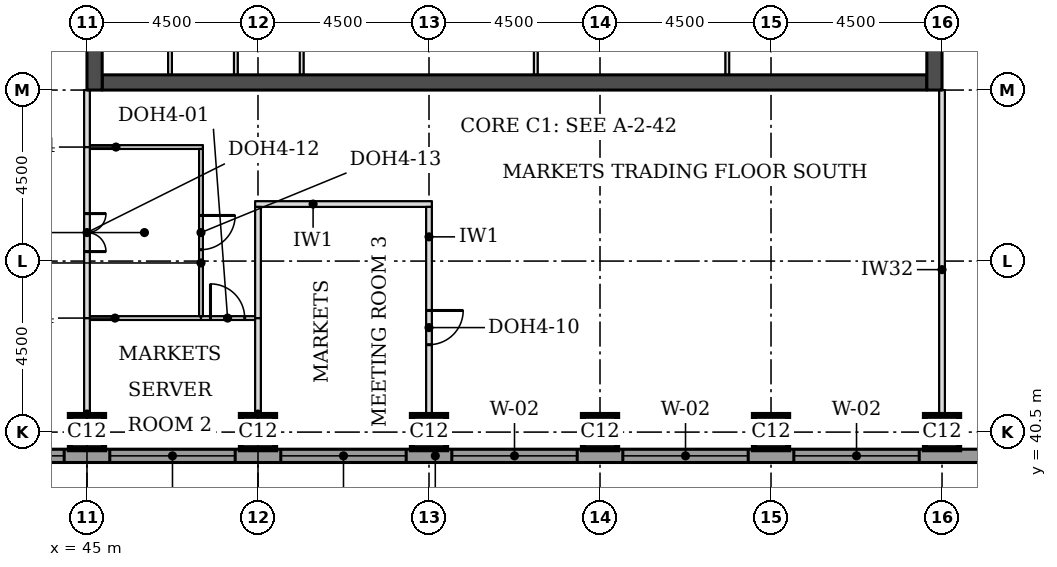
"""IFC4 building model, lengths in metres.
Left out: names, types, materials, properties, quantities, classifications, styles, units other than length and angle.
Written with IfcOpenShell. Run it as: python <this file> out.ifc"""

import sys

from ifc_helpers import new_model, si_unit, direction, frame, frame_2d, origin, origin_2d, place, context, subcontext, project, spatial, rectangle, extrude, element, fill, save


model = new_model("IFC4")
c1 = context("Model", 3, precision=1e-05, world=origin(), true_north=direction((0.0, 1.0)))
c2 = subcontext(c1, "Body", "Model", "MODEL_VIEW")
j1 = project(units=[si_unit("LENGTHUNIT", "METRE"), si_unit("PLANEANGLEUNIT", "RADIAN")], contexts=[c1])
p1 = place(None, origin())
s1 = spatial("IfcSite", under=j1, at=p1, CompositionType="ELEMENT")
p2 = place(p1, origin())
s2 = spatial("IfcBuilding", under=s1, at=p2, CompositionType="ELEMENT")
p3 = place(p2, frame((0.0, 0.0, 169.9)))
s3 = spatial("IfcBuildingStorey", under=s2, at=p3, CompositionType="ELEMENT", Elevation=169.9)
for number, where, z_axis, x_axis in (
    (1, (45.0, 40.5, 0.0), (0.0, 0.0, 1.0), (1.0, 0.0, 0.0)),
    (2, (49.5, 40.5, 0.0), (0.0, 0.0, 1.0), (1.0, 0.0, 0.0)),
    (3, (54.0, 40.5, 0.0), (0.0, 0.0, 1.0), (1.0, 0.0, 0.0)),
    (4, (58.5, 40.5, 0.0), (0.0, 0.0, 1.0), (1.0, 0.0, 0.0)),
    (5, (63.0, 40.5, 0.0), (0.0, 0.0, 1.0), (1.0, 0.0, 0.0)),
    (6, (67.5, 40.5, 0.0), (0.0, 0.0, 1.0), (1.0, 0.0, 0.0)),
):
    element("IfcColumn", number, at=place(p3, frame(where, z_axis=z_axis, x_axis=x_axis)), inside=s3, PredefinedType="COLUMN", context=c2, shape_type="SweptSolid", body=[
        extrude(rectangle(XDim=0.9, YDim=0.9, at=origin_2d()), origin(), (0.0, 0.0, 1.0), 3.7),
    ])
p4 = place(p3, frame((45.4, 49.7, 0.0), z_axis=(0.0, 0.0, 1.0), x_axis=(1.0, 0.0, 0.0)))
e7 = element("IfcWall", 7, at=p4, inside=s3, PredefinedType="SHEAR", context=c2, shape_type="SweptSolid", body=[
    extrude(rectangle(XDim=21.7, YDim=0.4, at=frame_2d((10.85, 0.0))), origin(), (0.0, 0.0, 1.0), 3.7),
])
p5 = place(p3, frame((45.2, 49.5, 0.0), z_axis=(0.0, 0.0, 1.0), x_axis=(0.0, 1.0, 0.0)))
e8 = element("IfcWall", 8, at=p5, inside=s3, PredefinedType="SHEAR", context=c2, shape_type="SweptSolid", body=[
    extrude(rectangle(XDim=22.5, YDim=0.4, at=frame_2d((11.25, 0.0))), origin(), (0.0, 0.0, 1.0), 3.7),
])
p6 = place(p5, frame((4.2, 0.0, 0.0)))
e9 = element("IfcOpeningElement", 9, at=p6, cuts=e8, PredefinedType="OPENING", context=c2, shape_type="SweptSolid", body=[
    extrude(rectangle(XDim=1.8, YDim=2.1, at=frame_2d((0.9, 1.05))), frame((0.0, 0.21, 0.0), z_axis=(0.0, -1.0, 0.0), x_axis=(1.0, 0.0, 0.0)), (0.0, 0.0, 1.0), 0.42),
])
p7 = place(p5, frame((6.9, 0.0, 0.0)))
e10 = element("IfcOpeningElement", 10, at=p7, cuts=e8, PredefinedType="OPENING", context=c2, shape_type="SweptSolid", body=[
    extrude(rectangle(XDim=1.1, YDim=2.1, at=frame_2d((0.55, 1.05))), frame((0.0, 0.21, 0.0), z_axis=(0.0, -1.0, 0.0), x_axis=(1.0, 0.0, 0.0)), (0.0, 0.0, 1.0), 0.42),
])
p8 = place(p5, frame((13.6, 0.0, 0.0)))
e11 = element("IfcOpeningElement", 11, at=p8, cuts=e8, PredefinedType="OPENING", context=c2, shape_type="SweptSolid", body=[
    extrude(rectangle(XDim=1.1, YDim=2.1, at=frame_2d((0.55, 1.05))), frame((0.0, 0.21, 0.0), z_axis=(0.0, -1.0, 0.0), x_axis=(1.0, 0.0, 0.0)), (0.0, 0.0, 1.0), 0.42),
])
p9 = place(p5, frame((16.5, 0.0, 0.0)))
e12 = element("IfcOpeningElement", 12, at=p9, cuts=e8, PredefinedType="OPENING", context=c2, shape_type="SweptSolid", body=[
    extrude(rectangle(XDim=1.8, YDim=2.1, at=frame_2d((0.9, 1.05))), frame((0.0, 0.21, 0.0), z_axis=(0.0, -1.0, 0.0), x_axis=(1.0, 0.0, 0.0)), (0.0, 0.0, 1.0), 0.42),
])
p10 = place(p3, frame((67.3, 49.5, 0.0), z_axis=(0.0, 0.0, 1.0), x_axis=(0.0, 1.0, 0.0)))
e13 = element("IfcWall", 13, at=p10, inside=s3, PredefinedType="SHEAR", context=c2, shape_type="SweptSolid", body=[
    extrude(rectangle(XDim=22.5, YDim=0.4, at=frame_2d((11.25, 0.0))), origin(), (0.0, 0.0, 1.0), 3.7),
])
p11 = place(p10, frame((4.2, 0.0, 0.0)))
e14 = element("IfcOpeningElement", 14, at=p11, cuts=e13, PredefinedType="OPENING", context=c2, shape_type="SweptSolid", body=[
    extrude(rectangle(XDim=1.8, YDim=2.1, at=frame_2d((0.9, 1.05))), frame((0.0, 0.21, 0.0), z_axis=(0.0, -1.0, 0.0), x_axis=(1.0, 0.0, 0.0)), (0.0, 0.0, 1.0), 0.42),
])
p12 = place(p10, frame((6.9, 0.0, 0.0)))
e15 = element("IfcOpeningElement", 15, at=p12, cuts=e13, PredefinedType="OPENING", context=c2, shape_type="SweptSolid", body=[
    extrude(rectangle(XDim=1.1, YDim=2.1, at=frame_2d((0.55, 1.05))), frame((0.0, 0.21, 0.0), z_axis=(0.0, -1.0, 0.0), x_axis=(1.0, 0.0, 0.0)), (0.0, 0.0, 1.0), 0.42),
])
p13 = place(p10, frame((13.6, 0.0, 0.0)))
e16 = element("IfcOpeningElement", 16, at=p13, cuts=e13, PredefinedType="OPENING", context=c2, shape_type="SweptSolid", body=[
    extrude(rectangle(XDim=1.1, YDim=2.1, at=frame_2d((0.55, 1.05))), frame((0.0, 0.21, 0.0), z_axis=(0.0, -1.0, 0.0), x_axis=(1.0, 0.0, 0.0)), (0.0, 0.0, 1.0), 0.42),
])
p14 = place(p10, frame((16.5, 0.0, 0.0)))
e17 = element("IfcOpeningElement", 17, at=p14, cuts=e13, PredefinedType="OPENING", context=c2, shape_type="SweptSolid", body=[
    extrude(rectangle(XDim=1.8, YDim=2.1, at=frame_2d((0.9, 1.05))), frame((0.0, 0.21, 0.0), z_axis=(0.0, -1.0, 0.0), x_axis=(1.0, 0.0, 0.0)), (0.0, 0.0, 1.0), 0.42),
])
p15 = place(p3, frame((36.0, 39.875, 0.0), z_axis=(0.0, 0.0, 1.0), x_axis=(1.0, 0.0, 0.0)))
e18 = element("IfcWall", 18, at=p15, inside=s3, PredefinedType="STANDARD", context=c2, shape_type="SweptSolid", body=[
    extrude(rectangle(XDim=36.331, YDim=0.35, at=frame_2d((18.166, 0.0))), origin(), (0.0, 0.0, 1.0), 3.525),
])
p16 = place(p15, frame((5.1, 0.0, 0.9)))
e19 = element("IfcOpeningElement", 19, at=p16, cuts=e18, PredefinedType="OPENING", context=c2, shape_type="SweptSolid", body=[
    extrude(rectangle(XDim=3.3, YDim=1.9, at=frame_2d((1.65, 0.95))), frame((0.0, 0.185, 0.0), z_axis=(0.0, -1.0, 0.0), x_axis=(1.0, 0.0, 0.0)), (0.0, 0.0, 1.0), 0.37),
])
p17 = place(p15, frame((9.6, 0.0, 0.9)))
e20 = element("IfcOpeningElement", 20, at=p17, cuts=e18, PredefinedType="OPENING", context=c2, shape_type="SweptSolid", body=[
    extrude(rectangle(XDim=3.3, YDim=1.9, at=frame_2d((1.65, 0.95))), frame((0.0, 0.185, 0.0), z_axis=(0.0, -1.0, 0.0), x_axis=(1.0, 0.0, 0.0)), (0.0, 0.0, 1.0), 0.37),
])
p18 = place(p15, frame((14.1, 0.0, 0.9)))
e21 = element("IfcOpeningElement", 21, at=p18, cuts=e18, PredefinedType="OPENING", context=c2, shape_type="SweptSolid", body=[
    extrude(rectangle(XDim=3.3, YDim=1.9, at=frame_2d((1.65, 0.95))), frame((0.0, 0.185, 0.0), z_axis=(0.0, -1.0, 0.0), x_axis=(1.0, 0.0, 0.0)), (0.0, 0.0, 1.0), 0.37),
])
p19 = place(p15, frame((18.6, 0.0, 0.9)))
e22 = element("IfcOpeningElement", 22, at=p19, cuts=e18, PredefinedType="OPENING", context=c2, shape_type="SweptSolid", body=[
    extrude(rectangle(XDim=3.3, YDim=1.9, at=frame_2d((1.65, 0.95))), frame((0.0, 0.185, 0.0), z_axis=(0.0, -1.0, 0.0), x_axis=(1.0, 0.0, 0.0)), (0.0, 0.0, 1.0), 0.37),
])
p20 = place(p15, frame((23.1, 0.0, 0.9)))
e23 = element("IfcOpeningElement", 23, at=p20, cuts=e18, PredefinedType="OPENING", context=c2, shape_type="SweptSolid", body=[
    extrude(rectangle(XDim=3.3, YDim=1.9, at=frame_2d((1.65, 0.95))), frame((0.0, 0.185, 0.0), z_axis=(0.0, -1.0, 0.0), x_axis=(1.0, 0.0, 0.0)), (0.0, 0.0, 1.0), 0.37),
])
p21 = place(p15, frame((27.6, 0.0, 0.9)))
e24 = element("IfcOpeningElement", 24, at=p21, cuts=e18, PredefinedType="OPENING", context=c2, shape_type="SweptSolid", body=[
    extrude(rectangle(XDim=3.3, YDim=1.9, at=frame_2d((1.65, 0.95))), frame((0.0, 0.185, 0.0), z_axis=(0.0, -1.0, 0.0), x_axis=(1.0, 0.0, 0.0)), (0.0, 0.0, 1.0), 0.37),
])
p22 = place(p3, frame((45.075, 43.5, 0.0), z_axis=(0.0, 0.0, 1.0), x_axis=(1.0, 0.0, 0.0)))
e25 = element("IfcWall", 25, at=p22, inside=s3, PredefinedType="PARTITIONING", context=c2, shape_type="SweptSolid", body=[
    extrude(rectangle(XDim=2.925, YDim=0.1, at=frame_2d((1.462, 0.0))), origin(), (0.0, 0.0, 1.0), 3.55),
])
p23 = place(p3, frame((48.0, 43.5, 0.0), z_axis=(0.0, 0.0, 1.0), x_axis=(1.0, 0.0, 0.0)))
e26 = element("IfcWall", 26, at=p23, inside=s3, PredefinedType="PARTITIONING", context=c2, shape_type="SweptSolid", body=[
    extrude(rectangle(XDim=1.425, YDim=0.1, at=frame_2d((0.712, 0.0))), origin(), (0.0, 0.0, 1.0), 3.55),
])
p24 = place(p23, frame((0.25, 0.0, 0.0)))
e27 = element("IfcOpeningElement", 27, at=p24, cuts=e26, PredefinedType="OPENING", context=c2, shape_type="SweptSolid", body=[
    extrude(rectangle(XDim=0.9, YDim=2.1, at=frame_2d((0.45, 1.05))), frame((0.0, 0.06, 0.0), z_axis=(0.0, -1.0, 0.0), x_axis=(1.0, 0.0, 0.0)), (0.0, 0.0, 1.0), 0.12),
])
p25 = place(p3, frame((49.425, 46.5, 0.0), z_axis=(0.0, 0.0, 1.0), x_axis=(1.0, 0.0, 0.0)))
e28 = element("IfcWall", 28, at=p25, inside=s3, PredefinedType="PARTITIONING", context=c2, shape_type="SweptSolid", body=[
    extrude(rectangle(XDim=4.65, YDim=0.15, at=frame_2d((2.325, 0.0))), origin(), (0.0, 0.0, 1.0), 3.55),
])
p26 = place(p3, frame((45.075, 48.0, 0.0), z_axis=(0.0, 0.0, 1.0), x_axis=(1.0, 0.0, 0.0)))
e29 = element("IfcWall", 29, at=p26, inside=s3, PredefinedType="PARTITIONING", context=c2, shape_type="SweptSolid", body=[
    extrude(rectangle(XDim=2.975, YDim=0.1, at=frame_2d((1.488, 0.0))), origin(), (0.0, 0.0, 1.0), 3.55),
])
p27 = place(p3, frame((45.0, 40.05, 0.0), z_axis=(0.0, 0.0, 1.0), x_axis=(0.0, 1.0, 0.0)))
e30 = element("IfcWall", 30, at=p27, inside=s3, PredefinedType="PARTITIONING", context=c2, shape_type="SweptSolid", body=[
    extrude(rectangle(XDim=3.45, YDim=0.15, at=frame_2d((1.725, 0.0))), origin(), (0.0, 0.0, 1.0), 3.022),
])
p28 = place(p3, frame((49.5, 40.05, 0.0), z_axis=(0.0, 0.0, 1.0), x_axis=(0.0, 1.0, 0.0)))
e31 = element("IfcWall", 31, at=p28, inside=s3, PredefinedType="PARTITIONING", context=c2, shape_type="SweptSolid", body=[
    extrude(rectangle(XDim=3.45, YDim=0.15, at=frame_2d((1.725, 0.0))), origin(), (0.0, 0.0, 1.0), 3.55),
])
p29 = place(p3, frame((54.0, 40.05, 0.0), z_axis=(0.0, 0.0, 1.0), x_axis=(0.0, 1.0, 0.0)))
e32 = element("IfcWall", 32, at=p29, inside=s3, PredefinedType="PARTITIONING", context=c2, shape_type="SweptSolid", body=[
    extrude(rectangle(XDim=6.375, YDim=0.15, at=frame_2d((3.188, 0.0))), origin(), (0.0, 0.0, 1.0), 3.55),
])
p30 = place(p29, frame((2.75, 0.0, 0.0)))
e33 = element("IfcOpeningElement", 33, at=p30, cuts=e32, PredefinedType="OPENING", context=c2, shape_type="SweptSolid", body=[
    extrude(rectangle(XDim=0.9, YDim=2.1, at=frame_2d((0.45, 1.05))), frame((0.0, 0.085, 0.0), z_axis=(0.0, -1.0, 0.0), x_axis=(1.0, 0.0, 0.0)), (0.0, 0.0, 1.0), 0.17),
])
p31 = place(p3, frame((67.5, 40.05, 0.0), z_axis=(0.0, 0.0, 1.0), x_axis=(0.0, 1.0, 0.0)))
e34 = element("IfcWall", 34, at=p31, inside=s3, PredefinedType="PARTITIONING", context=c2, shape_type="SweptSolid", body=[
    extrude(rectangle(XDim=9.45, YDim=0.15, at=frame_2d((4.725, 0.0))), origin(), (0.0, 0.0, 1.0), 3.022),
])
p32 = place(p3, frame((45.0, 43.5, 0.0), z_axis=(0.0, 0.0, 1.0), x_axis=(0.0, 1.0, 0.0)))
e35 = element("IfcWall", 35, at=p32, inside=s3, PredefinedType="PARTITIONING", context=c2, shape_type="SweptSolid", body=[
    extrude(rectangle(XDim=4.5, YDim=0.15, at=frame_2d((2.25, 0.0))), origin(), (0.0, 0.0, 1.0), 3.022),
])
p33 = place(p32, frame((1.75, 0.0, 0.0)))
e36 = element("IfcOpeningElement", 36, at=p33, cuts=e35, PredefinedType="OPENING", context=c2, shape_type="SweptSolid", body=[
    extrude(rectangle(XDim=1.0, YDim=2.1, at=frame_2d((0.5, 1.05))), frame((0.0, 0.085, 0.0), z_axis=(0.0, -1.0, 0.0), x_axis=(1.0, 0.0, 0.0)), (0.0, 0.0, 1.0), 0.17),
])
p34 = place(p3, frame((49.5, 43.5, 0.0), z_axis=(0.0, 0.0, 1.0), x_axis=(0.0, 1.0, 0.0)))
e37 = element("IfcWall", 37, at=p34, inside=s3, PredefinedType="PARTITIONING", context=c2, shape_type="SweptSolid", body=[
    extrude(rectangle(XDim=2.925, YDim=0.15, at=frame_2d((1.462, 0.0))), origin(), (0.0, 0.0, 1.0), 3.55),
])
p35 = place(p3, frame((48.0, 43.55, 0.0), z_axis=(0.0, 0.0, 1.0), x_axis=(0.0, 1.0, 0.0)))
e38 = element("IfcWall", 38, at=p35, inside=s3, PredefinedType="PARTITIONING", context=c2, shape_type="SweptSolid", body=[
    extrude(rectangle(XDim=4.4, YDim=0.1, at=frame_2d((2.2, 0.0))), origin(), (0.0, 0.0, 1.0), 3.55),
])
p36 = place(p35, frame((1.75, 0.0, 0.0)))
e39 = element("IfcOpeningElement", 39, at=p36, cuts=e38, PredefinedType="OPENING", context=c2, shape_type="SweptSolid", body=[
    extrude(rectangle(XDim=0.9, YDim=2.1, at=frame_2d((0.45, 1.05))), frame((0.0, 0.06, 0.0), z_axis=(0.0, -1.0, 0.0), x_axis=(1.0, 0.0, 0.0)), (0.0, 0.0, 1.0), 0.12),
])
p37 = place(p3, frame((45.0, 48.0, 0.0), z_axis=(0.0, 0.0, 1.0), x_axis=(0.0, 1.0, 0.0)))
e40 = element("IfcWall", 40, at=p37, inside=s3, PredefinedType="PARTITIONING", context=c2, shape_type="SweptSolid", body=[
    extrude(rectangle(XDim=1.5, YDim=0.15, at=frame_2d((0.75, 0.0))), origin(), (0.0, 0.0, 1.0), 3.022),
])
for number, where, z_axis, x_axis in (
    (41, (47.185, 49.9, 0.0), (0.0, 0.0, 1.0), (0.0, 1.0, 0.0)),
    (42, (48.917, 49.9, 0.0), (0.0, 0.0, 1.0), (0.0, 1.0, 0.0)),
    (43, (50.65, 49.9, 0.0), (0.0, 0.0, 1.0), (0.0, 1.0, 0.0)),
    (44, (56.81, 49.9, 0.0), (0.0, 0.0, 1.0), (0.0, 1.0, 0.0)),
    (45, (61.85, 49.9, 0.0), (0.0, 0.0, 1.0), (0.0, 1.0, 0.0)),
):
    element("IfcWall", number, at=place(p3, frame(where, z_axis=z_axis, x_axis=x_axis)), inside=s3, PredefinedType="PARTITIONING", context=c2, shape_type="SweptSolid", body=[
        extrude(rectangle(XDim=3.1, YDim=0.1, at=frame_2d((1.55, 0.0))), origin(), (0.0, 0.0, 1.0), 3.55),
    ])
p38 = place(p16, origin())
e46 = element("IfcWindow", 46, at=p38, inside=s3, PartitioningType="SINGLE_PANEL", PredefinedType="WINDOW", context=c2, shape_type="SweptSolid", body=[
    extrude(rectangle(XDim=3.3, YDim=1.9, at=frame_2d((1.65, 0.95))), frame((0.0, 0.085, 0.0), z_axis=(0.0, -1.0, 0.0), x_axis=(1.0, 0.0, 0.0)), (0.0, 0.0, 1.0), 0.06),
])
fill(e19, e46)
p39 = place(p17, origin())
e47 = element("IfcWindow", 47, at=p39, inside=s3, PartitioningType="SINGLE_PANEL", PredefinedType="WINDOW", context=c2, shape_type="SweptSolid", body=[
    extrude(rectangle(XDim=3.3, YDim=1.9, at=frame_2d((1.65, 0.95))), frame((0.0, 0.085, 0.0), z_axis=(0.0, -1.0, 0.0), x_axis=(1.0, 0.0, 0.0)), (0.0, 0.0, 1.0), 0.06),
])
fill(e20, e47)
p40 = place(p18, origin())
e48 = element("IfcWindow", 48, at=p40, inside=s3, PartitioningType="SINGLE_PANEL", PredefinedType="WINDOW", context=c2, shape_type="SweptSolid", body=[
    extrude(rectangle(XDim=3.3, YDim=1.9, at=frame_2d((1.65, 0.95))), frame((0.0, 0.085, 0.0), z_axis=(0.0, -1.0, 0.0), x_axis=(1.0, 0.0, 0.0)), (0.0, 0.0, 1.0), 0.06),
])
fill(e21, e48)
p41 = place(p19, origin())
e49 = element("IfcWindow", 49, at=p41, inside=s3, PartitioningType="SINGLE_PANEL", PredefinedType="WINDOW", context=c2, shape_type="SweptSolid", body=[
    extrude(rectangle(XDim=3.3, YDim=1.9, at=frame_2d((1.65, 0.95))), frame((0.0, 0.085, 0.0), z_axis=(0.0, -1.0, 0.0), x_axis=(1.0, 0.0, 0.0)), (0.0, 0.0, 1.0), 0.06),
])
fill(e22, e49)
p42 = place(p20, origin())
e50 = element("IfcWindow", 50, at=p42, inside=s3, PartitioningType="SINGLE_PANEL", PredefinedType="WINDOW", context=c2, shape_type="SweptSolid", body=[
    extrude(rectangle(XDim=3.3, YDim=1.9, at=frame_2d((1.65, 0.95))), frame((0.0, 0.085, 0.0), z_axis=(0.0, -1.0, 0.0), x_axis=(1.0, 0.0, 0.0)), (0.0, 0.0, 1.0), 0.06),
])
fill(e23, e50)
p43 = place(p21, origin())
e51 = element("IfcWindow", 51, at=p43, inside=s3, PartitioningType="SINGLE_PANEL", PredefinedType="WINDOW", context=c2, shape_type="SweptSolid", body=[
    extrude(rectangle(XDim=3.3, YDim=1.9, at=frame_2d((1.65, 0.95))), frame((0.0, 0.085, 0.0), z_axis=(0.0, -1.0, 0.0), x_axis=(1.0, 0.0, 0.0)), (0.0, 0.0, 1.0), 0.06),
])
fill(e24, e51)
p44 = place(p33, frame((1.0, 0.0, 0.0), z_axis=(0.0, 0.0, 1.0), x_axis=(-1.0, 0.0, 0.0)))
e52 = element("IfcDoor", 52, at=p44, inside=s3, OperationType="DOUBLE_DOOR_SINGLE_SWING", PredefinedType="DOOR", context=c2, shape_type="SweptSolid", body=[
    extrude(rectangle(XDim=1.0, YDim=2.1, at=frame_2d((0.5, 1.05))), frame((0.0, 0.025, 0.0), z_axis=(0.0, -1.0, 0.0), x_axis=(1.0, 0.0, 0.0)), (0.0, 0.0, 1.0), 0.05),
])
fill(e36, e52)
p45 = place(p36, frame((0.9, 0.0, 0.0), z_axis=(0.0, 0.0, 1.0), x_axis=(-1.0, 0.0, 0.0)))
e53 = element("IfcDoor", 53, at=p45, inside=s3, OperationType="SINGLE_SWING_LEFT", PredefinedType="DOOR", context=c2, shape_type="SweptSolid", body=[
    extrude(rectangle(XDim=0.9, YDim=2.1, at=frame_2d((0.45, 1.05))), frame((0.0, 0.025, 0.0), z_axis=(0.0, -1.0, 0.0), x_axis=(1.0, 0.0, 0.0)), (0.0, 0.0, 1.0), 0.05),
])
fill(e39, e53)
p46 = place(p30, frame((0.9, 0.0, 0.0), z_axis=(0.0, 0.0, 1.0), x_axis=(-1.0, 0.0, 0.0)))
e54 = element("IfcDoor", 54, at=p46, inside=s3, OperationType="SINGLE_SWING_LEFT", PredefinedType="DOOR", context=c2, shape_type="SweptSolid", body=[
    extrude(rectangle(XDim=0.9, YDim=2.1, at=frame_2d((0.45, 1.05))), frame((0.0, 0.025, 0.0), z_axis=(0.0, -1.0, 0.0), x_axis=(1.0, 0.0, 0.0)), (0.0, 0.0, 1.0), 0.05),
])
fill(e33, e54)
p47 = place(p24, origin())
e55 = element("IfcDoor", 55, at=p47, inside=s3, OperationType="SINGLE_SWING_LEFT", PredefinedType="DOOR", context=c2, shape_type="SweptSolid", body=[
    extrude(rectangle(XDim=0.9, YDim=2.1, at=frame_2d((0.45, 1.05))), frame((0.0, 0.025, 0.0), z_axis=(0.0, -1.0, 0.0), x_axis=(1.0, 0.0, 0.0)), (0.0, 0.0, 1.0), 0.05),
])
fill(e27, e55)
save(model, sys.argv[1])
